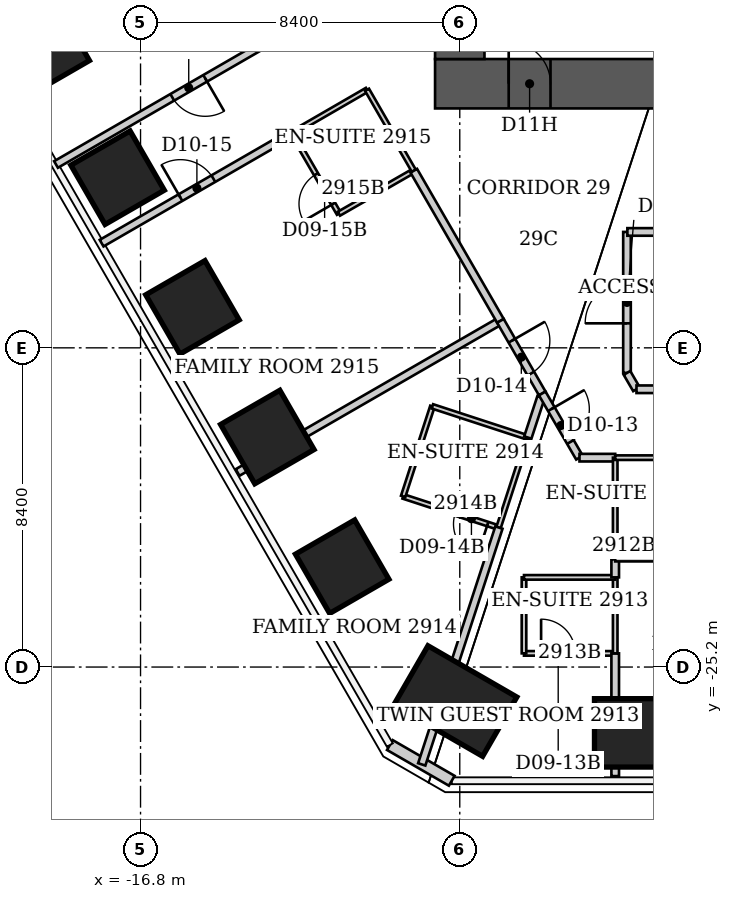
"""IFC4 building model, lengths in metres.
Left out: names, types, materials, properties, quantities, classifications, styles, units other than length and angle.
Written with IfcOpenShell. Run it as: python <this file> out.ifc"""

import sys

from ifc_helpers import new_model, si_unit, direction, frame, frame_2d, origin, origin_2d, place, context, subcontext, project, spatial, rectangle, extrude, element, fill, save


model = new_model("IFC4")
c1 = context("Model", 3, precision=1e-05, world=origin(), true_north=direction((0.0, 1.0)))
c2 = subcontext(c1, "Body", "Model", "MODEL_VIEW")
j1 = project(units=[si_unit("LENGTHUNIT", "METRE"), si_unit("PLANEANGLEUNIT", "RADIAN")], contexts=[c1])
p1 = place(None, origin())
s1 = spatial("IfcSite", under=j1, at=p1, CompositionType="ELEMENT")
p2 = place(p1, origin())
s2 = spatial("IfcBuilding", under=s1, at=p2, CompositionType="ELEMENT")
p3 = place(p2, frame((0.0, 0.0, 119.6)))
s3 = spatial("IfcBuildingStorey", under=s2, at=p3, CompositionType="ELEMENT", Elevation=119.6)
p4 = place(p3, frame((-3.955, -26.932, 0.0), z_axis=(0.0, 0.0, 1.0), x_axis=(0.0, -1.0, 0.0)))
e1 = element("IfcColumn", 1, at=p4, inside=s3, PredefinedType="COLUMN", context=c2, shape_type="SweptSolid", body=[
    extrude(rectangle(XDim=1.8, YDim=1.8, at=origin_2d()), origin(), (0.0, 0.0, 1.0), 3.8),
])
p5 = place(p3, frame((-8.518, -26.094, 0.0), z_axis=(0.0, 0.0, 1.0), x_axis=(-0.5, -0.866025403784, 0.0)))
e2 = element("IfcColumn", 2, at=p5, inside=s3, PredefinedType="COLUMN", context=c2, shape_type="SweptSolid", body=[
    extrude(rectangle(XDim=1.8, YDim=2.7, at=origin_2d()), origin(), (0.0, 0.0, 1.0), 3.8),
])
for number, where, z_axis, x_axis in (
    (3, (-11.494, -22.559, 0.0), (0.0, 0.0, 1.0), (-0.866, -0.5, 0.0)),
    (4, (-13.464, -19.147, 0.0), (0.0, 0.0, 1.0), (-0.866, -0.5, 0.0)),
    (5, (-15.434, -15.735, 0.0), (0.0, 0.0, 1.0), (-0.866, -0.5, 0.0)),
    (6, (-17.404, -12.323, 0.0), (0.0, 0.0, 1.0), (-0.866, -0.5, 0.0)),
    (7, (-19.374, -8.911, 0.0), (0.0, 0.0, 1.0), (-0.866, -0.5, 0.0)),
):
    element("IfcColumn", number, at=place(p3, frame(where, z_axis=z_axis, x_axis=x_axis)), inside=s3, PredefinedType="COLUMN", context=c2, shape_type="SweptSolid", body=[
        extrude(rectangle(XDim=1.8, YDim=1.8, at=origin_2d()), origin(), (0.0, 0.0, 1.0), 3.8),
    ])
p6 = place(p3, frame((-9.05, -9.85, 0.0), z_axis=(0.0, 0.0, 1.0), x_axis=(1.0, 0.0, 0.0)))
e8 = element("IfcWall", 8, at=p6, inside=s3, PredefinedType="SHEAR", context=c2, shape_type="SweptSolid", body=[
    extrude(rectangle(XDim=18.1, YDim=1.3, at=frame_2d((9.05, 0.0))), origin(), (0.0, 0.0, 1.0), 3.8),
])
p7 = place(p6, frame((1.938, 0.0, 0.0)))
e9 = element("IfcOpeningElement", 9, at=p7, cuts=e8, PredefinedType="OPENING", context=c2, shape_type="SweptSolid", body=[
    extrude(rectangle(XDim=1.1, YDim=2.2, at=frame_2d((0.55, 1.1))), frame((0.0, 0.65, 0.0), z_axis=(0.0, -1.0, 0.0), x_axis=(1.0, 0.0, 0.0)), (0.0, 0.0, 1.0), 1.3),
])
p8 = place(p6, frame((9.812, 0.0, 0.0)))
e10 = element("IfcOpeningElement", 10, at=p8, cuts=e8, PredefinedType="OPENING", context=c2, shape_type="SweptSolid", body=[
    extrude(rectangle(XDim=1.1, YDim=2.1, at=frame_2d((0.55, 1.05))), frame((0.0, 0.65, 0.0), z_axis=(0.0, -1.0, 0.0), x_axis=(1.0, 0.0, 0.0)), (0.0, 0.0, 1.0), 1.3),
])
p9 = place(p6, frame((12.438, 0.0, 0.0)))
e11 = element("IfcOpeningElement", 11, at=p9, cuts=e8, PredefinedType="OPENING", context=c2, shape_type="SweptSolid", body=[
    extrude(rectangle(XDim=1.1, YDim=2.1, at=frame_2d((0.55, 1.05))), frame((0.0, 0.65, 0.0), z_axis=(0.0, -1.0, 0.0), x_axis=(1.0, 0.0, 0.0)), (0.0, 0.0, 1.0), 1.3),
])
p10 = place(p6, frame((15.062, 0.0, 0.0)))
e12 = element("IfcOpeningElement", 12, at=p10, cuts=e8, PredefinedType="OPENING", context=c2, shape_type="SweptSolid", body=[
    extrude(rectangle(XDim=1.1, YDim=2.1, at=frame_2d((0.55, 1.05))), frame((0.0, 0.65, 0.0), z_axis=(0.0, -1.0, 0.0), x_axis=(1.0, 0.0, 0.0)), (0.0, 0.0, 1.0), 1.3),
])
p11 = place(p3, frame((-8.4, -9.2, 0.0), z_axis=(0.0, 0.0, 1.0), x_axis=(0.0, 1.0, 0.0)))
e13 = element("IfcWall", 13, at=p11, inside=s3, PredefinedType="SHEAR", context=c2, shape_type="SweptSolid", body=[
    extrude(rectangle(XDim=15.3, YDim=1.3, at=frame_2d((7.65, 0.0))), origin(), (0.0, 0.0, 1.0), 3.8),
])
p12 = place(p11, frame((10.7, 0.0, 0.0)))
e14 = element("IfcOpeningElement", 14, at=p12, cuts=e13, PredefinedType="OPENING", context=c2, shape_type="SweptSolid", body=[
    extrude(rectangle(XDim=1.2, YDim=2.2, at=frame_2d((0.6, 1.1))), frame((0.0, 0.65, 0.0), z_axis=(0.0, -1.0, 0.0), x_axis=(1.0, 0.0, 0.0)), (0.0, 0.0, 1.0), 1.3),
])
p13 = place(p3, frame((-8.611, -28.192, 0.0), z_axis=(0.0, 0.0, 1.0), x_axis=(-0.866045024864, 0.499966013754, 0.0)))
e15 = element("IfcWall", 15, at=p13, inside=s3, PredefinedType="SOLIDWALL", context=c2, shape_type="SweptSolid", body=[
    extrude(rectangle(XDim=1.88, YDim=0.3, at=frame_2d((0.94, 0.0))), origin(), (0.0, 0.0, 1.0), 3.64),
])
p14 = place(p3, frame((-17.824, -14.045, 0.0), z_axis=(0.0, 0.0, 1.0), x_axis=(0.866007919525, 0.500030282404, 0.0)))
e16 = element("IfcWall", 16, at=p14, inside=s3, PredefinedType="PARTITIONING", context=c2, shape_type="SweptSolid", body=[
    extrude(rectangle(XDim=5.79, YDim=0.2, at=frame_2d((2.895, 0.0))), origin(), (0.0, 0.0, 1.0), 3.64),
])
p15 = place(p14, frame((2.395, 0.0, 0.0)))
e17 = element("IfcOpeningElement", 17, at=p15, cuts=e16, PredefinedType="OPENING", context=c2, shape_type="SweptSolid", body=[
    extrude(rectangle(XDim=1.0, YDim=2.13, at=frame_2d((0.5, 1.065))), frame((0.0, 0.1, 0.0), z_axis=(0.0, -1.0, 0.0), x_axis=(1.0, 0.0, 0.0)), (0.0, 0.0, 1.0), 0.2),
])
p16 = place(p3, frame((-14.246, -20.08, 0.0), z_axis=(0.0, 0.0, 1.0), x_axis=(0.866178955952, 0.49973394548, 0.0)))
e18 = element("IfcWall", 18, at=p16, inside=s3, PredefinedType="PARTITIONING", context=c2, shape_type="SweptSolid", body=[
    extrude(rectangle(XDim=7.969, YDim=0.2, at=frame_2d((3.985, 0.0))), origin(), (0.0, 0.0, 1.0), 3.64),
])
p17 = place(p3, frame((-12.81, -11.15, 0.0), z_axis=(0.0, 0.0, 1.0), x_axis=(0.501813488763, -0.864975850817, 0.0)))
e19 = element("IfcWall", 19, at=p17, inside=s3, PredefinedType="PARTITIONING", context=c2, shape_type="SweptSolid", body=[
    extrude(rectangle(XDim=2.451, YDim=0.12, at=frame_2d((1.226, 0.0))), origin(), (0.0, 0.0, 1.0), 3.64),
])
p18 = place(p17, frame((1.251, 0.0, 0.0)))
e20 = element("IfcOpeningElement", 20, at=p18, cuts=e19, PredefinedType="OPENING", context=c2, shape_type="SweptSolid", body=[
    extrude(rectangle(XDim=0.9, YDim=2.03, at=frame_2d((0.45, 1.015))), frame((0.0, 0.06, 0.0), z_axis=(0.0, -1.0, 0.0), x_axis=(1.0, 0.0, 0.0)), (0.0, 0.0, 1.0), 0.12),
])
p19 = place(p3, frame((-12.81, -11.15, 0.0), z_axis=(0.0, 0.0, 1.0), x_axis=(0.865543766642, 0.500833293649, 0.0)))
e21 = element("IfcWall", 21, at=p19, inside=s3, PredefinedType="PARTITIONING", context=c2, shape_type="SweptSolid", body=[
    extrude(rectangle(XDim=2.276, YDim=0.12, at=frame_2d((1.138, 0.0))), origin(), (0.0, 0.0, 1.0), 3.64),
])
p20 = place(p3, frame((-12.04, -7.94, 0.0), z_axis=(0.0, 0.0, 1.0), x_axis=(-0.86587701925, -0.500256921525, 0.0)))
e22 = element("IfcWall", 22, at=p20, inside=s3, PredefinedType="PARTITIONING", context=c2, shape_type="SweptSolid", body=[
    extrude(rectangle(XDim=8.066, YDim=0.2, at=frame_2d((4.033, 0.0))), origin(), (0.0, 0.0, 1.0), 3.64),
])
p21 = place(p20, frame((3.533, 0.0, 0.0)))
e23 = element("IfcOpeningElement", 23, at=p21, cuts=e22, PredefinedType="OPENING", context=c2, shape_type="SweptSolid", body=[
    extrude(rectangle(XDim=1.0, YDim=2.13, at=frame_2d((0.5, 1.065))), frame((0.0, 0.1, 0.0), z_axis=(0.0, -1.0, 0.0), x_axis=(1.0, 0.0, 0.0)), (0.0, 0.0, 1.0), 0.2),
])
p22 = place(p3, frame((-11.58, -13.27, 0.0), z_axis=(0.0, 0.0, 1.0), x_axis=(0.867428373024, 0.497562074192, 0.0)))
e24 = element("IfcWall", 24, at=p22, inside=s3, PredefinedType="PARTITIONING", context=c2, shape_type="SweptSolid", body=[
    extrude(rectangle(XDim=2.271, YDim=0.12, at=frame_2d((1.136, 0.0))), origin(), (0.0, 0.0, 1.0), 3.64),
])
p23 = place(p3, frame((-10.84, -10.01, 0.0), z_axis=(0.0, 0.0, 1.0), x_axis=(0.500089055364, -0.86597398154, 0.0)))
e25 = element("IfcWall", 25, at=p23, inside=s3, PredefinedType="PARTITIONING", context=c2, shape_type="SweptSolid", body=[
    extrude(rectangle(XDim=2.459, YDim=0.12, at=frame_2d((1.23, 0.0))), origin(), (0.0, 0.0, 1.0), 3.64),
])
p24 = place(p3, frame((-9.89, -20.71, 0.0), z_axis=(0.0, 0.0, 1.0), x_axis=(0.950543631688, -0.310591056307, 0.0)))
e26 = element("IfcWall", 26, at=p24, inside=s3, PredefinedType="PARTITIONING", context=c2, shape_type="SweptSolid", body=[
    extrude(rectangle(XDim=2.64, YDim=0.12, at=frame_2d((1.32, 0.0))), origin(), (0.0, 0.0, 1.0), 3.64),
])
p25 = place(p24, frame((1.44, 0.0, 0.0)))
e27 = element("IfcOpeningElement", 27, at=p25, cuts=e26, PredefinedType="OPENING", context=c2, shape_type="SweptSolid", body=[
    extrude(rectangle(XDim=0.9, YDim=2.03, at=frame_2d((0.45, 1.015))), frame((0.0, 0.06, 0.0), z_axis=(0.0, -1.0, 0.0), x_axis=(1.0, 0.0, 0.0)), (0.0, 0.0, 1.0), 0.12),
])
p26 = place(p3, frame((-9.61, -12.14, 0.0), z_axis=(0.0, 0.0, 1.0), x_axis=(0.499898533245, -0.866083977718, 0.0)))
e28 = element("IfcWall", 28, at=p26, inside=s3, PredefinedType="PARTITIONING", context=c2, shape_type="SweptSolid", body=[
    extrude(rectangle(XDim=4.561, YDim=0.2, at=frame_2d((2.281, 0.0))), origin(), (0.0, 0.0, 1.0), 3.64),
])
for number, where, z_axis, x_axis in (
    (29, (-9.12, -18.34, 0.0), (0.0, 0.0, 1.0), (-0.309, -0.951, 0.0)),
    (30, (-7.38, -21.53, 0.0), (0.0, 0.0, 1.0), (0.309, 0.951, 0.0)),
):
    element("IfcWall", number, at=place(p3, frame(where, z_axis=z_axis, x_axis=x_axis)), inside=s3, PredefinedType="PARTITIONING", context=c2, shape_type="SweptSolid", body=[
        extrude(rectangle(XDim=2.492, YDim=0.12, at=frame_2d((1.246, 0.0))), origin(), (0.0, 0.0, 1.0), 3.64),
    ])
p27 = place(p3, frame((-7.37, -21.53, 0.0), z_axis=(0.0, 0.0, 1.0), x_axis=(-0.309817104215, -0.950796172655, 0.0)))
e31 = element("IfcWall", 31, at=p27, inside=s3, PredefinedType="PARTITIONING", context=c2, shape_type="SweptSolid", body=[
    extrude(rectangle(XDim=6.554, YDim=0.2, at=frame_2d((3.277, 0.0))), origin(), (0.0, 0.0, 1.0), 3.64),
])
p28 = place(p3, frame((-7.33, -16.09, 0.0), z_axis=(0.0, 0.0, 1.0), x_axis=(0.499118212815, -0.866533905648, 0.0)))
e32 = element("IfcWall", 32, at=p28, inside=s3, PredefinedType="PARTITIONING", context=c2, shape_type="SweptSolid", body=[
    extrude(rectangle(XDim=2.204, YDim=0.2, at=frame_2d((1.102, 0.0))), origin(), (0.0, 0.0, 1.0), 3.64),
])
p29 = place(p28, frame((0.602, 0.0, 0.0)))
e33 = element("IfcOpeningElement", 33, at=p29, cuts=e32, PredefinedType="OPENING", context=c2, shape_type="SweptSolid", body=[
    extrude(rectangle(XDim=1.0, YDim=2.13, at=frame_2d((0.5, 1.065))), frame((0.0, 0.1, 0.0), z_axis=(0.0, -1.0, 0.0), x_axis=(1.0, 0.0, 0.0)), (0.0, 0.0, 1.0), 0.2),
])
p30 = place(p3, frame((-6.71, -24.84, 0.0), z_axis=(0.0, 0.0, 1.0), x_axis=(1.0, 0.0, 0.0)))
e34 = element("IfcWall", 34, at=p30, inside=s3, PredefinedType="PARTITIONING", context=c2, shape_type="SweptSolid", body=[
    extrude(rectangle(XDim=2.4, YDim=0.12, at=frame_2d((1.2, 0.0))), origin(), (0.0, 0.0, 1.0), 3.64),
])
p31 = place(p30, frame((0.45, 0.0, 0.0)))
e35 = element("IfcOpeningElement", 35, at=p31, cuts=e34, PredefinedType="OPENING", context=c2, shape_type="SweptSolid", body=[
    extrude(rectangle(XDim=0.9, YDim=2.03, at=frame_2d((0.45, 1.015))), frame((0.0, 0.06, 0.0), z_axis=(0.0, -1.0, 0.0), x_axis=(1.0, 0.0, 0.0)), (0.0, 0.0, 1.0), 0.12),
])
p32 = place(p3, frame((-6.71, -22.84, 0.0), z_axis=(0.0, 0.0, 1.0), x_axis=(0.0, -1.0, 0.0)))
e36 = element("IfcWall", 36, at=p32, inside=s3, PredefinedType="PARTITIONING", context=c2, shape_type="SweptSolid", body=[
    extrude(rectangle(XDim=2.0, YDim=0.12, at=frame_2d((1.0, 0.0))), origin(), (0.0, 0.0, 1.0), 3.64),
])
p33 = place(p3, frame((-6.61, -19.16, 0.0), z_axis=(0.0, 0.0, 1.0), x_axis=(-0.950570927373, 0.31050750721, 0.0)))
e37 = element("IfcWall", 37, at=p33, inside=s3, PredefinedType="PARTITIONING", context=c2, shape_type="SweptSolid", body=[
    extrude(rectangle(XDim=2.64, YDim=0.12, at=frame_2d((1.32, 0.0))), origin(), (0.0, 0.0, 1.0), 3.64),
])
p34 = place(p3, frame((-6.61, -19.16, 0.0), z_axis=(0.0, 0.0, 1.0), x_axis=(0.311430803564, 0.9502688328, 0.0)))
e38 = element("IfcWall", 38, at=p34, inside=s3, PredefinedType="PARTITIONING", context=c2, shape_type="SweptSolid", body=[
    extrude(rectangle(XDim=1.115, YDim=0.2, at=frame_2d((0.558, 0.0))), origin(), (0.0, 0.0, 1.0), 3.64),
])
p35 = place(p3, frame((-6.23, -18.0, 0.0), z_axis=(0.0, 0.0, 1.0), x_axis=(0.501647016168, -0.86507240805, 0.0)))
e39 = element("IfcWall", 39, at=p35, inside=s3, PredefinedType="PARTITIONING", context=c2, shape_type="SweptSolid", body=[
    extrude(rectangle(XDim=1.954, YDim=0.2, at=frame_2d((0.977, 0.0))), origin(), (0.0, 0.0, 1.0), 3.64),
])
p36 = place(p35, frame((0.477, 0.0, 0.0)))
e40 = element("IfcOpeningElement", 40, at=p36, cuts=e39, PredefinedType="OPENING", context=c2, shape_type="SweptSolid", body=[
    extrude(rectangle(XDim=1.0, YDim=2.13, at=frame_2d((0.5, 1.065))), frame((0.0, 0.1, 0.0), z_axis=(0.0, -1.0, 0.0), x_axis=(1.0, 0.0, 0.0)), (0.0, 0.0, 1.0), 0.2),
])
p37 = place(p3, frame((-5.25, -19.69, 0.0), z_axis=(0.0, 0.0, 1.0), x_axis=(1.0, 0.0, 0.0)))
e41 = element("IfcWall", 41, at=p37, inside=s3, PredefinedType="PARTITIONING", context=c2, shape_type="SweptSolid", body=[
    extrude(rectangle(XDim=0.94, YDim=0.2, at=frame_2d((0.47, 0.0))), origin(), (0.0, 0.0, 1.0), 3.64),
])
p38 = place(p3, frame((-4.31, -28.07, 0.0), z_axis=(0.0, 0.0, 1.0), x_axis=(0.0, 1.0, 0.0)))
e42 = element("IfcWall", 42, at=p38, inside=s3, PredefinedType="PARTITIONING", context=c2, shape_type="SweptSolid", body=[
    extrude(rectangle(XDim=3.23, YDim=0.2, at=frame_2d((1.615, 0.0))), origin(), (0.0, 0.0, 1.0), 3.64),
])
p39 = place(p3, frame((-4.31, -24.84, 0.0), z_axis=(0.0, 0.0, 1.0), x_axis=(0.0, 1.0, 0.0)))
e43 = element("IfcWall", 43, at=p39, inside=s3, PredefinedType="PARTITIONING", context=c2, shape_type="SweptSolid", body=[
    extrude(rectangle(XDim=2.0, YDim=0.12, at=frame_2d((1.0, 0.0))), origin(), (0.0, 0.0, 1.0), 3.64),
])
p40 = place(p3, frame((-4.31, -22.84, 0.0), z_axis=(0.0, 0.0, 1.0), x_axis=(-1.0, 0.0, 0.0)))
e44 = element("IfcWall", 44, at=p40, inside=s3, PredefinedType="PARTITIONING", context=c2, shape_type="SweptSolid", body=[
    extrude(rectangle(XDim=2.4, YDim=0.12, at=frame_2d((1.2, 0.0))), origin(), (0.0, 0.0, 1.0), 3.64),
])
p41 = place(p3, frame((-4.31, -22.84, 0.0), z_axis=(0.0, 0.0, 1.0), x_axis=(0.0, 1.0, 0.0)))
e45 = element("IfcWall", 45, at=p41, inside=s3, PredefinedType="PARTITIONING", context=c2, shape_type="SweptSolid", body=[
    extrude(rectangle(XDim=0.48, YDim=0.2, at=frame_2d((0.24, 0.0))), origin(), (0.0, 0.0, 1.0), 3.64),
])
p42 = place(p3, frame((-4.31, -22.36, 0.0), z_axis=(0.0, 0.0, 1.0), x_axis=(0.0, 1.0, 0.0)))
e46 = element("IfcWall", 46, at=p42, inside=s3, PredefinedType="PARTITIONING", context=c2, shape_type="SweptSolid", body=[
    extrude(rectangle(XDim=2.67, YDim=0.12, at=frame_2d((1.335, 0.0))), origin(), (0.0, 0.0, 1.0), 3.64),
])
for number, where, z_axis, x_axis in (
    (47, (-4.31, -22.36, 0.0), (0.0, 0.0, 1.0), (1.0, 0.0, 0.0)),
    (48, (-4.31, -19.69, 0.0), (0.0, 0.0, 1.0), (1.0, 0.0, 0.0)),
):
    element("IfcWall", number, at=place(p3, frame(where, z_axis=z_axis, x_axis=x_axis)), inside=s3, PredefinedType="PARTITIONING", context=c2, shape_type="SweptSolid", body=[
        extrude(rectangle(XDim=2.45, YDim=0.12, at=frame_2d((1.225, 0.0))), origin(), (0.0, 0.0, 1.0), 3.64),
    ])
p43 = place(p3, frame((-4.0, -17.46, 0.0), z_axis=(0.0, 0.0, 1.0), x_axis=(0.0, 1.0, 0.0)))
e49 = element("IfcWall", 49, at=p43, inside=s3, PredefinedType="PARTITIONING", context=c2, shape_type="SweptSolid", body=[
    extrude(rectangle(XDim=3.71, YDim=0.2, at=frame_2d((1.855, 0.0))), origin(), (0.0, 0.0, 1.0), 2.878),
])
p44 = place(p43, frame((1.305, 0.0, 0.0)))
e50 = element("IfcOpeningElement", 50, at=p44, cuts=e49, PredefinedType="OPENING", context=c2, shape_type="SweptSolid", body=[
    extrude(rectangle(XDim=1.1, YDim=2.2, at=frame_2d((0.55, 1.1))), frame((0.0, 0.1, 0.0), z_axis=(0.0, -1.0, 0.0), x_axis=(1.0, 0.0, 0.0)), (0.0, 0.0, 1.0), 0.2),
])
p45 = place(p3, frame((-3.99, -13.75, 0.0), z_axis=(0.0, 0.0, 1.0), x_axis=(1.0, 0.0, 0.0)))
e51 = element("IfcWall", 51, at=p45, inside=s3, PredefinedType="PARTITIONING", context=c2, shape_type="SweptSolid", body=[
    extrude(rectangle(XDim=2.79, YDim=0.2, at=frame_2d((1.395, 0.0))), origin(), (0.0, 0.0, 1.0), 3.64),
])
p46 = place(p3, frame((-3.75, -17.89, 0.0), z_axis=(0.0, 0.0, 1.0), x_axis=(-0.502680181512, 0.864472460588, 0.0)))
e52 = element("IfcWall", 52, at=p46, inside=s3, PredefinedType="PARTITIONING", context=c2, shape_type="SweptSolid", body=[
    extrude(rectangle(XDim=0.497, YDim=0.2, at=frame_2d((0.249, 0.0))), origin(), (0.0, 0.0, 1.0), 3.64),
])
p47 = place(p3, frame((-1.2, -17.89, 0.0), z_axis=(0.0, 0.0, 1.0), x_axis=(-1.0, 0.0, 0.0)))
e53 = element("IfcWall", 53, at=p47, inside=s3, PredefinedType="PARTITIONING", context=c2, shape_type="SweptSolid", body=[
    extrude(rectangle(XDim=2.55, YDim=0.2, at=frame_2d((1.275, 0.0))), origin(), (0.0, 0.0, 1.0), 3.64),
])
p48 = place(p36, origin())
e54 = element("IfcDoor", 54, at=p48, inside=s3, OperationType="SINGLE_SWING_LEFT", PredefinedType="DOOR", context=c2, shape_type="SweptSolid", body=[
    extrude(rectangle(XDim=1.0, YDim=2.13, at=frame_2d((0.5, 1.065))), frame((0.0, 0.025, 0.0), z_axis=(0.0, -1.0, 0.0), x_axis=(1.0, 0.0, 0.0)), (0.0, 0.0, 1.0), 0.05),
])
fill(e40, e54)
p49 = place(p31, origin())
e55 = element("IfcDoor", 55, at=p49, inside=s3, OperationType="SINGLE_SWING_LEFT", PredefinedType="DOOR", context=c2, shape_type="SweptSolid", body=[
    extrude(rectangle(XDim=0.9, YDim=2.03, at=frame_2d((0.45, 1.015))), frame((0.0, 0.025, 0.0), z_axis=(0.0, -1.0, 0.0), x_axis=(1.0, 0.0, 0.0)), (0.0, 0.0, 1.0), 0.05),
])
fill(e35, e55)
p50 = place(p29, origin())
e56 = element("IfcDoor", 56, at=p50, inside=s3, OperationType="SINGLE_SWING_LEFT", PredefinedType="DOOR", context=c2, shape_type="SweptSolid", body=[
    extrude(rectangle(XDim=1.0, YDim=2.13, at=frame_2d((0.5, 1.065))), frame((0.0, 0.025, 0.0), z_axis=(0.0, -1.0, 0.0), x_axis=(1.0, 0.0, 0.0)), (0.0, 0.0, 1.0), 0.05),
])
fill(e33, e56)
p51 = place(p25, origin())
e57 = element("IfcDoor", 57, at=p51, inside=s3, OperationType="SINGLE_SWING_RIGHT", PredefinedType="DOOR", context=c2, shape_type="SweptSolid", body=[
    extrude(rectangle(XDim=0.9, YDim=2.03, at=frame_2d((0.45, 1.015))), frame((0.0, 0.025, 0.0), z_axis=(0.0, -1.0, 0.0), x_axis=(1.0, 0.0, 0.0)), (0.0, 0.0, 1.0), 0.05),
])
fill(e27, e57)
p52 = place(p15, origin())
e58 = element("IfcDoor", 58, at=p52, inside=s3, OperationType="SINGLE_SWING_LEFT", PredefinedType="DOOR", context=c2, shape_type="SweptSolid", body=[
    extrude(rectangle(XDim=1.0, YDim=2.13, at=frame_2d((0.5, 1.065))), frame((0.0, 0.025, 0.0), z_axis=(0.0, -1.0, 0.0), x_axis=(1.0, 0.0, 0.0)), (0.0, 0.0, 1.0), 0.05),
])
fill(e17, e58)
p53 = place(p18, origin())
e59 = element("IfcDoor", 59, at=p53, inside=s3, OperationType="SINGLE_SWING_RIGHT", PredefinedType="DOOR", context=c2, shape_type="SweptSolid", body=[
    extrude(rectangle(XDim=0.9, YDim=2.03, at=frame_2d((0.45, 1.015))), frame((0.0, 0.025, 0.0), z_axis=(0.0, -1.0, 0.0), x_axis=(1.0, 0.0, 0.0)), (0.0, 0.0, 1.0), 0.05),
])
fill(e20, e59)
p54 = place(p21, origin())
e60 = element("IfcDoor", 60, at=p54, inside=s3, OperationType="SINGLE_SWING_LEFT", PredefinedType="DOOR", context=c2, shape_type="SweptSolid", body=[
    extrude(rectangle(XDim=1.0, YDim=2.13, at=frame_2d((0.5, 1.065))), frame((0.0, 0.025, 0.0), z_axis=(0.0, -1.0, 0.0), x_axis=(1.0, 0.0, 0.0)), (0.0, 0.0, 1.0), 0.05),
])
fill(e23, e60)
p55 = place(p44, origin())
e61 = element("IfcDoor", 61, at=p55, inside=s3, OperationType="SINGLE_SWING_LEFT", PredefinedType="DOOR", context=c2, shape_type="SweptSolid", body=[
    extrude(rectangle(XDim=1.1, YDim=2.2, at=frame_2d((0.55, 1.1))), frame((0.0, 0.025, 0.0), z_axis=(0.0, -1.0, 0.0), x_axis=(1.0, 0.0, 0.0)), (0.0, 0.0, 1.0), 0.05),
])
fill(e50, e61)
p56 = place(p7, origin())
e62 = element("IfcDoor", 62, at=p56, inside=s3, OperationType="SINGLE_SWING_LEFT", PredefinedType="DOOR", context=c2, shape_type="SweptSolid", body=[
    extrude(rectangle(XDim=1.1, YDim=2.2, at=frame_2d((0.55, 1.1))), frame((0.0, 0.025, 0.0), z_axis=(0.0, -1.0, 0.0), x_axis=(1.0, 0.0, 0.0)), (0.0, 0.0, 1.0), 0.05),
])
fill(e9, e62)
save(model, sys.argv[1])
